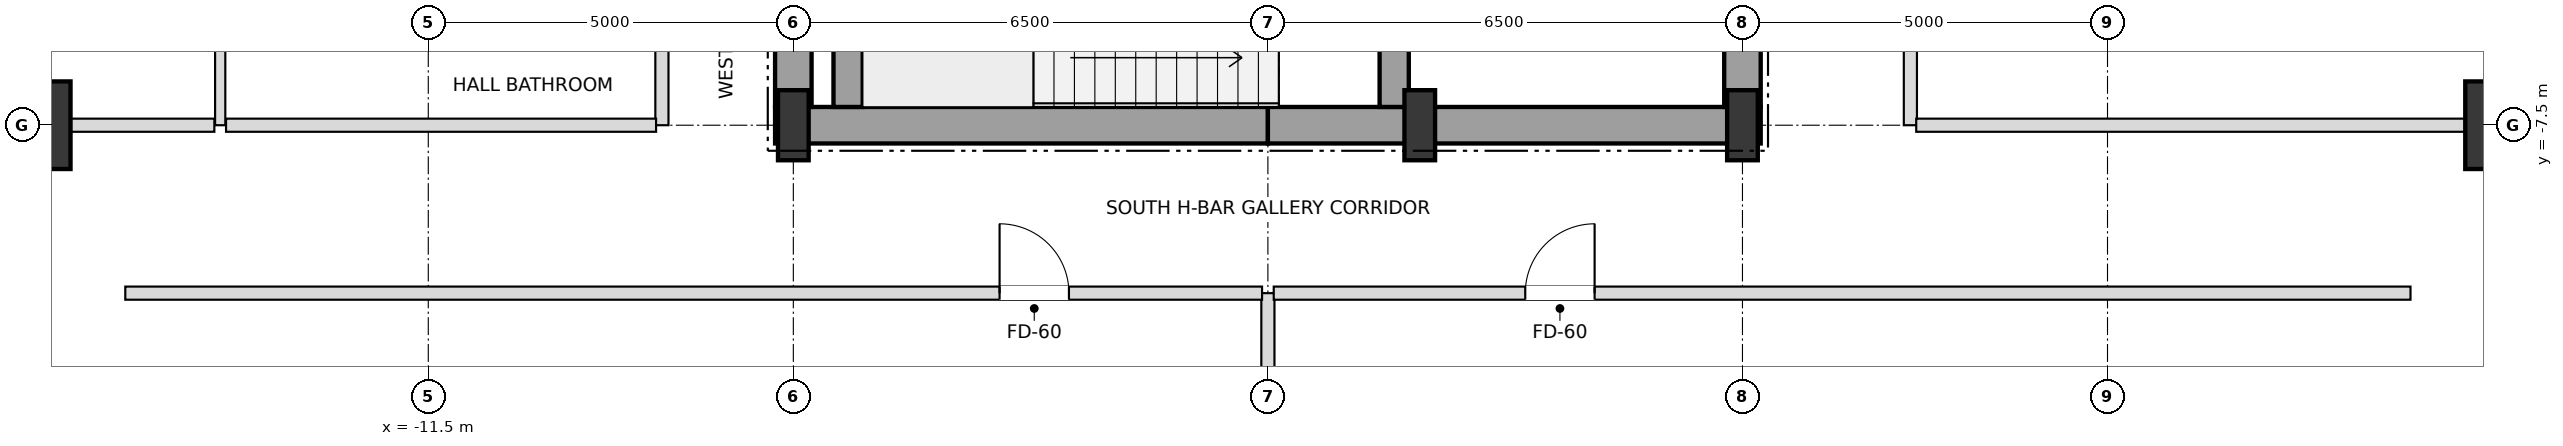
"""IFC4 building model, lengths in metres.
Left out: names, types, materials, properties, quantities, classifications, styles, units other than length and angle.
Written with IfcOpenShell. Run it as: python <this file> out.ifc"""

import sys

from ifc_helpers import new_model, si_unit, direction, frame, frame_2d, origin, origin_2d, place, context, subcontext, project, spatial, rectangle, i_section, extrude, element, fill, save


model = new_model("IFC4")
c1 = context("Model", 3, precision=1e-05, world=origin(), true_north=direction((0.0, 1.0)))
c2 = subcontext(c1, "Body", "Model", "MODEL_VIEW")
j1 = project(units=[si_unit("LENGTHUNIT", "METRE"), si_unit("PLANEANGLEUNIT", "RADIAN")], contexts=[c1])
p1 = place(None, origin())
s1 = spatial("IfcSite", under=j1, at=p1, CompositionType="ELEMENT")
p2 = place(p1, origin())
s2 = spatial("IfcBuilding", under=s1, at=p2, CompositionType="ELEMENT")
p3 = place(p2, frame((0.0, 0.0, 125.1)))
s3 = spatial("IfcBuildingStorey", under=s2, at=p3, CompositionType="ELEMENT", Elevation=125.1)
for number, where, z_axis, x_axis in (
    (1, (-6.5, -7.5, 0.0), (0.0, 0.0, 1.0), (1.0, 0.0, 0.0)),
    (2, (2.08, -7.5, 0.0), (0.0, 0.0, 1.0), (1.0, 0.0, 0.0)),
    (3, (6.5, -7.5, 0.0), (0.0, 0.0, 1.0), (1.0, 0.0, 0.0)),
):
    element("IfcColumn", number, at=place(p3, frame(where, z_axis=z_axis, x_axis=x_axis)), inside=s3, PredefinedType="COLUMN", context=c2, shape_type="SweptSolid", body=[
        extrude(i_section(OverallWidth=0.42, OverallDepth=0.96, WebThickness=0.022, FlangeThickness=0.034, at=origin_2d()), origin(), (0.0, 0.0, 1.0), 4.5),
    ])
for number, where, z_axis, x_axis in (
    (4, (17.0, -7.5, 0.0), (0.0, 0.0, 1.0), (1.0, 0.0, 0.0)),
    (5, (-17.0, -7.5, 0.0), (0.0, 0.0, 1.0), (1.0, 0.0, 0.0)),
):
    element("IfcColumn", number, at=place(p3, frame(where, z_axis=z_axis, x_axis=x_axis)), inside=s3, PredefinedType="USERDEFINED", context=c2, shape_type="SweptSolid", body=[
        extrude(rectangle(XDim=1.2, YDim=1.2, at=origin_2d()), origin(), (0.0, 0.0, 1.0), 4.5),
    ])
for number, where, z_axis, x_axis in (
    (6, (-6.75, -7.5, 0.0), (0.0, 0.0, 1.0), (1.0, 0.0, 0.0)),
    (7, (0.0, -7.5, 0.0), (0.0, 0.0, 1.0), (1.0, 0.0, 0.0)),
):
    element("IfcWall", number, at=place(p3, frame(where, z_axis=z_axis, x_axis=x_axis)), inside=s3, PredefinedType="SHEAR", context=c2, shape_type="SweptSolid", body=[
        extrude(rectangle(XDim=6.75, YDim=0.5, at=frame_2d((3.375, 0.0))), origin(), (0.0, 0.0, 1.0), 4.28),
    ])
p4 = place(p3, frame((-6.5, -7.25, 0.0), z_axis=(0.0, 0.0, 1.0), x_axis=(0.0, 1.0, 0.0)))
e8 = element("IfcWall", 8, at=p4, inside=s3, PredefinedType="SHEAR", context=c2, shape_type="SweptSolid", body=[
    extrude(rectangle(XDim=3.55, YDim=0.5, at=frame_2d((1.775, 0.0))), origin(), (0.0, 0.0, 1.0), 4.28),
])
p5 = place(p3, frame((6.5, -7.25, 0.0), z_axis=(0.0, 0.0, 1.0), x_axis=(0.0, 1.0, 0.0)))
e9 = element("IfcWall", 9, at=p5, inside=s3, PredefinedType="SHEAR", context=c2, shape_type="SweptSolid", body=[
    extrude(rectangle(XDim=5.75, YDim=0.5, at=frame_2d((2.875, 0.0))), origin(), (0.0, 0.0, 1.0), 4.28),
])
p6 = place(p5, frame((0.85, 0.0, 0.0)))
e10 = element("IfcOpeningElement", 10, at=p6, cuts=e9, PredefinedType="OPENING", context=c2, shape_type="SweptSolid", body=[
    extrude(rectangle(XDim=1.05, YDim=2.15, at=frame_2d((0.525, 1.075))), frame((0.0, 0.26, 0.0), z_axis=(0.0, -1.0, 0.0), x_axis=(1.0, 0.0, 0.0)), (0.0, 0.0, 1.0), 0.52),
])
p7 = place(p3, frame((-5.75, -7.25, 0.0), z_axis=(0.0, 0.0, 1.0), x_axis=(0.0, 1.0, 0.0)))
e11 = element("IfcWall", 11, at=p7, inside=s3, PredefinedType="SHEAR", context=c2, shape_type="SweptSolid", body=[
    extrude(rectangle(XDim=2.9, YDim=0.4, at=frame_2d((1.45, 0.0))), origin(), (0.0, 0.0, 1.0), 4.28),
])
p8 = place(p3, frame((1.73, -7.25, 0.0), z_axis=(0.0, 0.0, 1.0), x_axis=(0.0, 1.0, 0.0)))
e12 = element("IfcWall", 12, at=p8, inside=s3, PredefinedType="SHEAR", context=c2, shape_type="SweptSolid", body=[
    extrude(rectangle(XDim=3.3, YDim=0.4, at=frame_2d((1.65, 0.0))), origin(), (0.0, 0.0, 1.0), 4.28),
])
p9 = place(p8, frame((0.9, 0.0, 0.0)))
e13 = element("IfcOpeningElement", 13, at=p9, cuts=e12, PredefinedType="OPENING", context=c2, shape_type="SweptSolid", body=[
    extrude(rectangle(XDim=1.05, YDim=2.15, at=frame_2d((0.525, 1.075))), frame((0.0, 0.21, 0.0), z_axis=(0.0, -1.0, 0.0), x_axis=(1.0, 0.0, 0.0)), (0.0, 0.0, 1.0), 0.42),
])
p10 = place(p3, frame((-14.35, -7.5, 0.0), z_axis=(0.0, 0.0, 1.0), x_axis=(0.0, 1.0, 0.0)))
e14 = element("IfcWall", 14, at=p10, inside=s3, PredefinedType="PARTITIONING", context=c2, shape_type="SweptSolid", body=[
    extrude(rectangle(XDim=15.0, YDim=0.14, at=frame_2d((7.5, 0.0))), origin(), (0.0, 0.0, 1.0), 4.28),
])
p11 = place(p10, frame((3.475, 0.0, 0.0)))
e15 = element("IfcOpeningElement", 15, at=p11, cuts=e14, PredefinedType="OPENING", context=c2, shape_type="SweptSolid", body=[
    extrude(rectangle(XDim=0.95, YDim=2.1, at=frame_2d((0.475, 1.05))), frame((0.0, 0.08, 0.0), z_axis=(0.0, -1.0, 0.0), x_axis=(1.0, 0.0, 0.0)), (0.0, 0.0, 1.0), 0.16),
])
p12 = place(p3, frame((-8.3, -7.5, 0.0), z_axis=(0.0, 0.0, 1.0), x_axis=(0.0, 1.0, 0.0)))
e16 = element("IfcWall", 16, at=p12, inside=s3, PredefinedType="PARTITIONING", context=c2, shape_type="SweptSolid", body=[
    extrude(rectangle(XDim=15.0, YDim=0.18, at=frame_2d((7.5, 0.0))), origin(), (0.0, 0.0, 1.0), 4.28),
])
p13 = place(p12, frame((2.495, 0.0, 0.0)))
e17 = element("IfcOpeningElement", 17, at=p13, cuts=e16, PredefinedType="OPENING", context=c2, shape_type="SweptSolid", body=[
    extrude(rectangle(XDim=0.95, YDim=2.15, at=frame_2d((0.475, 1.075))), frame((0.0, 0.1, 0.0), z_axis=(0.0, -1.0, 0.0), x_axis=(1.0, 0.0, 0.0)), (0.0, 0.0, 1.0), 0.2),
])
p14 = place(p3, frame((0.0, -23.15, 0.0), z_axis=(0.0, 0.0, 1.0), x_axis=(0.0, 1.0, 0.0)))
e18 = element("IfcWall", 18, at=p14, inside=s3, PredefinedType="PARTITIONING", context=c2, shape_type="SweptSolid", body=[
    extrude(rectangle(XDim=13.35, YDim=0.18, at=frame_2d((6.675, 0.0))), origin(), (0.0, 0.0, 1.0), 3.716),
])
p15 = place(p3, frame((8.8, -7.5, 0.0), z_axis=(0.0, 0.0, 1.0), x_axis=(0.0, 1.0, 0.0)))
e19 = element("IfcWall", 19, at=p15, inside=s3, PredefinedType="PARTITIONING", context=c2, shape_type="SweptSolid", body=[
    extrude(rectangle(XDim=15.0, YDim=0.18, at=frame_2d((7.5, 0.0))), origin(), (0.0, 0.0, 1.0), 4.28),
])
p16 = place(p15, frame((2.425, 0.0, 0.0)))
e20 = element("IfcOpeningElement", 20, at=p16, cuts=e19, PredefinedType="OPENING", context=c2, shape_type="SweptSolid", body=[
    extrude(rectangle(XDim=0.95, YDim=2.15, at=frame_2d((0.475, 1.075))), frame((0.0, 0.1, 0.0), z_axis=(0.0, -1.0, 0.0), x_axis=(1.0, 0.0, 0.0)), (0.0, 0.0, 1.0), 0.2),
])
p17 = place(p15, frame((7.525, 0.0, 0.0)))
e21 = element("IfcOpeningElement", 21, at=p17, cuts=e19, PredefinedType="OPENING", context=c2, shape_type="SweptSolid", body=[
    extrude(rectangle(XDim=0.95, YDim=2.15, at=frame_2d((0.475, 1.075))), frame((0.0, 0.1, 0.0), z_axis=(0.0, -1.0, 0.0), x_axis=(1.0, 0.0, 0.0)), (0.0, 0.0, 1.0), 0.2),
])
p18 = place(p15, frame((12.225, 0.0, 0.0)))
e22 = element("IfcOpeningElement", 22, at=p18, cuts=e19, PredefinedType="OPENING", context=c2, shape_type="SweptSolid", body=[
    extrude(rectangle(XDim=0.95, YDim=2.15, at=frame_2d((0.475, 1.075))), frame((0.0, 0.1, 0.0), z_axis=(0.0, -1.0, 0.0), x_axis=(1.0, 0.0, 0.0)), (0.0, 0.0, 1.0), 0.2),
])
p19 = place(p3, frame((-15.65, -9.8, 0.0), z_axis=(0.0, 0.0, 1.0), x_axis=(1.0, 0.0, 0.0)))
e23 = element("IfcWall", 23, at=p19, inside=s3, PredefinedType="PARTITIONING", context=c2, shape_type="SweptSolid", body=[
    extrude(rectangle(XDim=15.57, YDim=0.18, at=frame_2d((7.785, 0.0))), origin(), (0.0, 0.0, 1.0), 3.716),
])
p20 = place(p19, frame((11.975, 0.0, 0.0)))
e24 = element("IfcOpeningElement", 24, at=p20, cuts=e23, PredefinedType="OPENING", context=c2, shape_type="SweptSolid", body=[
    extrude(rectangle(XDim=0.95, YDim=2.15, at=frame_2d((0.475, 1.075))), frame((0.0, 0.1, 0.0), z_axis=(0.0, -1.0, 0.0), x_axis=(1.0, 0.0, 0.0)), (0.0, 0.0, 1.0), 0.2),
])
p21 = place(p3, frame((0.08, -9.8, 0.0), z_axis=(0.0, 0.0, 1.0), x_axis=(1.0, 0.0, 0.0)))
e25 = element("IfcWall", 25, at=p21, inside=s3, PredefinedType="PARTITIONING", context=c2, shape_type="SweptSolid", body=[
    extrude(rectangle(XDim=15.57, YDim=0.18, at=frame_2d((7.785, 0.0))), origin(), (0.0, 0.0, 1.0), 3.716),
])
p22 = place(p21, frame((3.445, 0.0, 0.0)))
e26 = element("IfcOpeningElement", 26, at=p22, cuts=e25, PredefinedType="OPENING", context=c2, shape_type="SweptSolid", body=[
    extrude(rectangle(XDim=0.95, YDim=2.15, at=frame_2d((0.475, 1.075))), frame((0.0, 0.1, 0.0), z_axis=(0.0, -1.0, 0.0), x_axis=(1.0, 0.0, 0.0)), (0.0, 0.0, 1.0), 0.2),
])
p23 = place(p3, frame((-20.15, -7.5, 0.0), z_axis=(0.0, 0.0, 1.0), x_axis=(1.0, 0.0, 0.0)))
e27 = element("IfcWall", 27, at=p23, inside=s3, PredefinedType="PARTITIONING", context=c2, shape_type="SweptSolid", body=[
    extrude(rectangle(XDim=5.72, YDim=0.18, at=frame_2d((2.86, 0.0))), origin(), (0.0, 0.0, 1.0), 3.716),
])
p24 = place(p3, frame((-14.27, -7.5, 0.0), z_axis=(0.0, 0.0, 1.0), x_axis=(1.0, 0.0, 0.0)))
e28 = element("IfcWall", 28, at=p24, inside=s3, PredefinedType="PARTITIONING", context=c2, shape_type="SweptSolid", body=[
    extrude(rectangle(XDim=5.89, YDim=0.18, at=frame_2d((2.945, 0.0))), origin(), (0.0, 0.0, 1.0), 3.716),
])
p25 = place(p3, frame((8.88, -7.5, 0.0), z_axis=(0.0, 0.0, 1.0), x_axis=(1.0, 0.0, 0.0)))
e29 = element("IfcWall", 29, at=p25, inside=s3, PredefinedType="PARTITIONING", context=c2, shape_type="SweptSolid", body=[
    extrude(rectangle(XDim=11.27, YDim=0.18, at=frame_2d((5.635, 0.0))), origin(), (0.0, 0.0, 1.0), 3.716),
])
p26 = place(p20, origin())
e30 = element("IfcDoor", 30, at=p26, inside=s3, OperationType="SINGLE_SWING_LEFT", PredefinedType="DOOR", context=c2, shape_type="SweptSolid", body=[
    extrude(rectangle(XDim=0.95, YDim=2.15, at=frame_2d((0.475, 1.075))), frame((0.0, 0.025, 0.0), z_axis=(0.0, -1.0, 0.0), x_axis=(1.0, 0.0, 0.0)), (0.0, 0.0, 1.0), 0.05),
])
fill(e24, e30)
p27 = place(p22, origin())
e31 = element("IfcDoor", 31, at=p27, inside=s3, OperationType="SINGLE_SWING_RIGHT", PredefinedType="DOOR", context=c2, shape_type="SweptSolid", body=[
    extrude(rectangle(XDim=0.95, YDim=2.15, at=frame_2d((0.475, 1.075))), frame((0.0, 0.025, 0.0), z_axis=(0.0, -1.0, 0.0), x_axis=(1.0, 0.0, 0.0)), (0.0, 0.0, 1.0), 0.05),
])
fill(e26, e31)
save(model, sys.argv[1])
